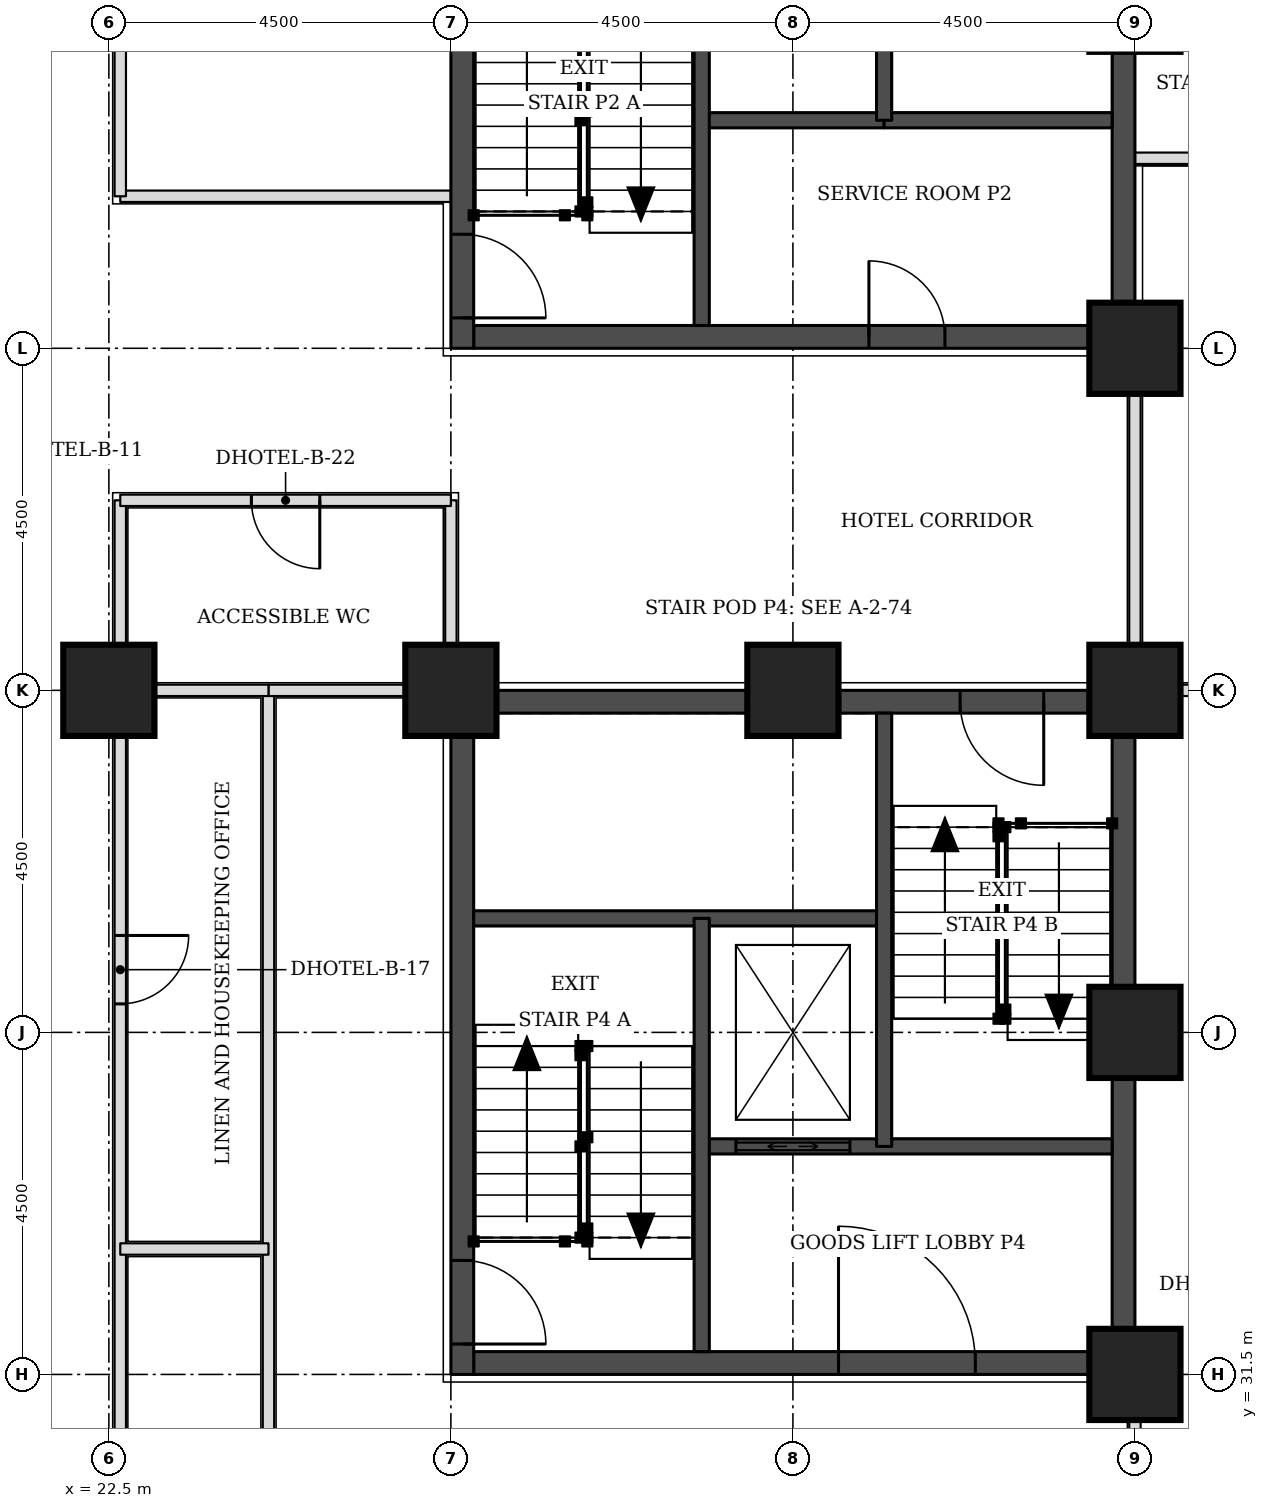
"""IFC4 building model, lengths in metres.
Left out: names, types, materials, properties, quantities, classifications, styles, units other than length and angle.
Written with IfcOpenShell. Run it as: python <this file> out.ifc"""

import sys

from ifc_helpers import new_model, si_unit, direction, frame, frame_2d, origin, origin_2d, place, context, subcontext, project, spatial, rectangle, extrude, element, fill, save


model = new_model("IFC4")
c1 = context("Model", 3, precision=1e-05, world=origin(), true_north=direction((0.0, 1.0)))
c2 = subcontext(c1, "Body", "Model", "MODEL_VIEW")
j1 = project(units=[si_unit("LENGTHUNIT", "METRE"), si_unit("PLANEANGLEUNIT", "RADIAN")], contexts=[c1])
p1 = place(None, origin())
s1 = spatial("IfcSite", under=j1, at=p1, CompositionType="ELEMENT")
p2 = place(p1, origin())
s2 = spatial("IfcBuilding", under=s1, at=p2, CompositionType="ELEMENT")
p3 = place(p2, frame((0.0, 0.0, 29.7)))
s3 = spatial("IfcBuildingStorey", under=s2, at=p3, CompositionType="ELEMENT", Elevation=29.7)
for number, where, z_axis, x_axis in (
    (1, (36.0, 31.5, 0.0), (0.0, 0.0, 1.0), (1.0, 0.0, 0.0)),
    (2, (36.0, 36.0, 0.0), (0.0, 0.0, 1.0), (1.0, 0.0, 0.0)),
    (3, (22.5, 40.5, 0.0), (0.0, 0.0, 1.0), (1.0, 0.0, 0.0)),
    (4, (27.0, 40.5, 0.0), (0.0, 0.0, 1.0), (1.0, 0.0, 0.0)),
    (5, (31.5, 40.5, 0.0), (0.0, 0.0, 1.0), (1.0, 0.0, 0.0)),
    (6, (36.0, 40.5, 0.0), (0.0, 0.0, 1.0), (1.0, 0.0, 0.0)),
    (7, (36.0, 45.0, 0.0), (0.0, 0.0, 1.0), (1.0, 0.0, 0.0)),
):
    element("IfcColumn", number, at=place(p3, frame(where, z_axis=z_axis, x_axis=x_axis)), inside=s3, PredefinedType="COLUMN", context=c2, shape_type="SweptSolid", body=[
        extrude(rectangle(XDim=1.2, YDim=1.2, at=origin_2d()), origin(), (0.0, 0.0, 1.0), 3.3),
    ])
p4 = place(p3, frame((27.3, 45.15, 0.0), z_axis=(0.0, 0.0, 1.0), x_axis=(1.0, 0.0, 0.0)))
e8 = element("IfcWall", 8, at=p4, inside=s3, PredefinedType="SHEAR", context=c2, shape_type="SweptSolid", body=[
    extrude(rectangle(XDim=8.4, YDim=0.3, at=frame_2d((4.2, 0.0))), origin(), (0.0, 0.0, 1.0), 3.3),
])
p5 = place(p4, frame((5.2, 0.0, 0.0)))
e9 = element("IfcOpeningElement", 9, at=p5, cuts=e8, PredefinedType="OPENING", context=c2, shape_type="SweptSolid", body=[
    extrude(rectangle(XDim=1.0, YDim=2.1, at=frame_2d((0.5, 1.05))), frame((0.0, 0.16, 0.0), z_axis=(0.0, -1.0, 0.0), x_axis=(1.0, 0.0, 0.0)), (0.0, 0.0, 1.0), 0.32),
])
p6 = place(p3, frame((27.15, 45.0, 0.0), z_axis=(0.0, 0.0, 1.0), x_axis=(0.0, 1.0, 0.0)))
e10 = element("IfcWall", 10, at=p6, inside=s3, PredefinedType="SHEAR", context=c2, shape_type="SweptSolid", body=[
    extrude(rectangle(XDim=9.0, YDim=0.3, at=frame_2d((4.5, 0.0))), origin(), (0.0, 0.0, 1.0), 3.3),
])
p7 = place(p6, frame((0.4, 0.0, 0.0)))
e11 = element("IfcOpeningElement", 11, at=p7, cuts=e10, PredefinedType="OPENING", context=c2, shape_type="SweptSolid", body=[
    extrude(rectangle(XDim=1.1, YDim=2.1, at=frame_2d((0.55, 1.05))), frame((0.0, 0.16, 0.0), z_axis=(0.0, -1.0, 0.0), x_axis=(1.0, 0.0, 0.0)), (0.0, 0.0, 1.0), 0.32),
])
p8 = place(p3, frame((35.85, 45.0, 0.0), z_axis=(0.0, 0.0, 1.0), x_axis=(0.0, 1.0, 0.0)))
e12 = element("IfcWall", 12, at=p8, inside=s3, PredefinedType="SHEAR", context=c2, shape_type="SweptSolid", body=[
    extrude(rectangle(XDim=9.0, YDim=0.3, at=frame_2d((4.5, 0.0))), origin(), (0.0, 0.0, 1.0), 3.3),
])
p9 = place(p3, frame((27.3, 31.65, 0.0), z_axis=(0.0, 0.0, 1.0), x_axis=(1.0, 0.0, 0.0)))
e13 = element("IfcWall", 13, at=p9, inside=s3, PredefinedType="SHEAR", context=c2, shape_type="SweptSolid", body=[
    extrude(rectangle(XDim=8.4, YDim=0.3, at=frame_2d((4.2, 0.0))), origin(), (0.0, 0.0, 1.0), 3.3),
])
p10 = place(p9, frame((4.8, 0.0, 0.0)))
e14 = element("IfcOpeningElement", 14, at=p10, cuts=e13, PredefinedType="OPENING", context=c2, shape_type="SweptSolid", body=[
    extrude(rectangle(XDim=1.8, YDim=2.1, at=frame_2d((0.9, 1.05))), frame((0.0, 0.16, 0.0), z_axis=(0.0, -1.0, 0.0), x_axis=(1.0, 0.0, 0.0)), (0.0, 0.0, 1.0), 0.32),
])
p11 = place(p3, frame((27.3, 40.35, 0.0), z_axis=(0.0, 0.0, 1.0), x_axis=(1.0, 0.0, 0.0)))
e15 = element("IfcWall", 15, at=p11, inside=s3, PredefinedType="SHEAR", context=c2, shape_type="SweptSolid", body=[
    extrude(rectangle(XDim=8.4, YDim=0.3, at=frame_2d((4.2, 0.0))), origin(), (0.0, 0.0, 1.0), 3.3),
])
p12 = place(p11, frame((6.4, 0.0, 0.0)))
e16 = element("IfcOpeningElement", 16, at=p12, cuts=e15, PredefinedType="OPENING", context=c2, shape_type="SweptSolid", body=[
    extrude(rectangle(XDim=1.1, YDim=2.1, at=frame_2d((0.55, 1.05))), frame((0.0, 0.16, 0.0), z_axis=(0.0, -1.0, 0.0), x_axis=(1.0, 0.0, 0.0)), (0.0, 0.0, 1.0), 0.32),
])
p13 = place(p3, frame((27.15, 31.5, 0.0), z_axis=(0.0, 0.0, 1.0), x_axis=(0.0, 1.0, 0.0)))
e17 = element("IfcWall", 17, at=p13, inside=s3, PredefinedType="SHEAR", context=c2, shape_type="SweptSolid", body=[
    extrude(rectangle(XDim=9.0, YDim=0.3, at=frame_2d((4.5, 0.0))), origin(), (0.0, 0.0, 1.0), 3.3),
])
p14 = place(p13, frame((0.4, 0.0, 0.0)))
e18 = element("IfcOpeningElement", 18, at=p14, cuts=e17, PredefinedType="OPENING", context=c2, shape_type="SweptSolid", body=[
    extrude(rectangle(XDim=1.1, YDim=2.1, at=frame_2d((0.55, 1.05))), frame((0.0, 0.16, 0.0), z_axis=(0.0, -1.0, 0.0), x_axis=(1.0, 0.0, 0.0)), (0.0, 0.0, 1.0), 0.32),
])
p15 = place(p3, frame((35.85, 31.5, 0.0), z_axis=(0.0, 0.0, 1.0), x_axis=(0.0, 1.0, 0.0)))
e19 = element("IfcWall", 19, at=p15, inside=s3, PredefinedType="SHEAR", context=c2, shape_type="SweptSolid", body=[
    extrude(rectangle(XDim=9.0, YDim=0.3, at=frame_2d((4.5, 0.0))), origin(), (0.0, 0.0, 1.0), 3.3),
])
p16 = place(p3, frame((22.65, 25.65, 0.0), z_axis=(0.0, 0.0, 1.0), x_axis=(0.0, 1.0, 0.0)))
e20 = element("IfcWall", 20, at=p16, inside=s3, PredefinedType="PARTITIONING", context=c2, shape_type="SweptSolid", body=[
    extrude(rectangle(XDim=17.35, YDim=0.15, at=frame_2d((8.675, 0.0))), origin(), (0.0, 0.0, 1.0), 3.08),
])
p17 = place(p16, frame((3.3, 0.0, 0.0)))
e21 = element("IfcOpeningElement", 21, at=p17, cuts=e20, PredefinedType="OPENING", context=c2, shape_type="SweptSolid", body=[
    extrude(rectangle(XDim=0.9, YDim=2.1, at=frame_2d((0.45, 1.05))), frame((0.0, 0.085, 0.0), z_axis=(0.0, -1.0, 0.0), x_axis=(1.0, 0.0, 0.0)), (0.0, 0.0, 1.0), 0.17),
])
p18 = place(p16, frame((10.725, 0.0, 0.0)))
e22 = element("IfcOpeningElement", 22, at=p18, cuts=e20, PredefinedType="OPENING", context=c2, shape_type="SweptSolid", body=[
    extrude(rectangle(XDim=0.9, YDim=2.1, at=frame_2d((0.45, 1.05))), frame((0.0, 0.085, 0.0), z_axis=(0.0, -1.0, 0.0), x_axis=(1.0, 0.0, 0.0)), (0.0, 0.0, 1.0), 0.17),
])
p19 = place(p3, frame((24.6, 25.65, 0.0), z_axis=(0.0, 0.0, 1.0), x_axis=(0.0, 1.0, 0.0)))
e23 = element("IfcWall", 23, at=p19, inside=s3, PredefinedType="PARTITIONING", context=c2, shape_type="SweptSolid", body=[
    extrude(rectangle(XDim=14.85, YDim=0.15, at=frame_2d((7.425, 0.0))), origin(), (0.0, 0.0, 1.0), 3.08),
])
p20 = place(p3, frame((36.0, 29.5, 0.0), z_axis=(0.0, 0.0, 1.0), x_axis=(0.0, 1.0, 0.0)))
e24 = element("IfcWall", 24, at=p20, inside=s3, PredefinedType="PARTITIONING", context=c2, shape_type="SweptSolid", body=[
    extrude(rectangle(XDim=1.95, YDim=0.15, at=frame_2d((0.975, 0.0))), origin(), (0.0, 0.0, 1.0), 2.33),
])
p21 = place(p3, frame((24.6, 40.5, 0.0), z_axis=(0.0, 0.0, 1.0), x_axis=(1.0, 0.0, 0.0)))
e25 = element("IfcWall", 25, at=p21, inside=s3, PredefinedType="PARTITIONING", context=c2, shape_type="SweptSolid", body=[
    extrude(rectangle(XDim=2.35, YDim=0.15, at=frame_2d((1.175, 0.0))), origin(), (0.0, 0.0, 1.0), 2.33),
])
p22 = place(p3, frame((27.0, 40.55, 0.0), z_axis=(0.0, 0.0, 1.0), x_axis=(0.0, 1.0, 0.0)))
e26 = element("IfcWall", 26, at=p22, inside=s3, PredefinedType="PARTITIONING", context=c2, shape_type="SweptSolid", body=[
    extrude(rectangle(XDim=2.45, YDim=0.15, at=frame_2d((1.225, 0.0))), origin(), (0.0, 0.0, 1.0), 3.08),
])
p23 = place(p3, frame((36.0, 40.55, 0.0), z_axis=(0.0, 0.0, 1.0), x_axis=(0.0, 1.0, 0.0)))
e27 = element("IfcWall", 27, at=p23, inside=s3, PredefinedType="PARTITIONING", context=c2, shape_type="SweptSolid", body=[
    extrude(rectangle(XDim=4.4, YDim=0.15, at=frame_2d((2.2, 0.0))), origin(), (0.0, 0.0, 1.0), 2.33),
])
p24 = place(p3, frame((22.65, 43.0, 0.0), z_axis=(0.0, 0.0, 1.0), x_axis=(1.0, 0.0, 0.0)))
e28 = element("IfcWall", 28, at=p24, inside=s3, PredefinedType="PARTITIONING", context=c2, shape_type="SweptSolid", body=[
    extrude(rectangle(XDim=4.35, YDim=0.15, at=frame_2d((2.175, 0.0))), origin(), (0.0, 0.0, 1.0), 3.08),
])
p25 = place(p24, frame((1.725, 0.0, 0.0)))
e29 = element("IfcOpeningElement", 29, at=p25, cuts=e28, PredefinedType="OPENING", context=c2, shape_type="SweptSolid", body=[
    extrude(rectangle(XDim=0.9, YDim=2.1, at=frame_2d((0.45, 1.05))), frame((0.0, 0.085, 0.0), z_axis=(0.0, -1.0, 0.0), x_axis=(1.0, 0.0, 0.0)), (0.0, 0.0, 1.0), 0.17),
])
p26 = place(p3, frame((22.65, 47.0, 0.0), z_axis=(0.0, 0.0, 1.0), x_axis=(1.0, 0.0, 0.0)))
e30 = element("IfcWall", 30, at=p26, inside=s3, PredefinedType="PARTITIONING", context=c2, shape_type="SweptSolid", body=[
    extrude(rectangle(XDim=4.35, YDim=0.15, at=frame_2d((2.175, 0.0))), origin(), (0.0, 0.0, 1.0), 3.08),
])
p27 = place(p3, frame((22.65, 47.0, 0.0), z_axis=(0.0, 0.0, 1.0), x_axis=(0.0, 1.0, 0.0)))
e31 = element("IfcWall", 31, at=p27, inside=s3, PredefinedType="PARTITIONING", context=c2, shape_type="SweptSolid", body=[
    extrude(rectangle(XDim=2.5, YDim=0.15, at=frame_2d((1.25, 0.0))), origin(), (0.0, 0.0, 1.0), 3.08),
])
p28 = place(p3, frame((22.65, 33.15, 0.0), z_axis=(0.0, 0.0, 1.0), x_axis=(1.0, 0.0, 0.0)))
e32 = element("IfcWall", 32, at=p28, inside=s3, PredefinedType="PARTITIONING", context=c2, shape_type="SweptSolid", body=[
    extrude(rectangle(XDim=1.95, YDim=0.15, at=frame_2d((0.975, 0.0))), origin(), (0.0, 0.0, 1.0), 3.08),
])
p29 = place(p3, frame((22.65, 40.5, 0.0), z_axis=(0.0, 0.0, 1.0), x_axis=(1.0, 0.0, 0.0)))
e33 = element("IfcWall", 33, at=p29, inside=s3, PredefinedType="PARTITIONING", context=c2, shape_type="SweptSolid", body=[
    extrude(rectangle(XDim=1.95, YDim=0.15, at=frame_2d((0.975, 0.0))), origin(), (0.0, 0.0, 1.0), 2.33),
])
p30 = place(p3, frame((36.05, 40.5, 0.0), z_axis=(0.0, 0.0, 1.0), x_axis=(1.0, 0.0, 0.0)))
e34 = element("IfcWall", 34, at=p30, inside=s3, PredefinedType="PARTITIONING", context=c2, shape_type="SweptSolid", body=[
    extrude(rectangle(XDim=2.45, YDim=0.15, at=frame_2d((1.225, 0.0))), origin(), (0.0, 0.0, 1.0), 2.33),
])
p31 = place(p3, frame((36.0, 47.5, 0.0), z_axis=(0.0, 0.0, 1.0), x_axis=(1.0, 0.0, 0.0)))
e35 = element("IfcWall", 35, at=p31, inside=s3, PredefinedType="PARTITIONING", context=c2, shape_type="SweptSolid", body=[
    extrude(rectangle(XDim=7.0, YDim=0.15, at=frame_2d((3.5, 0.0))), origin(), (0.0, 0.0, 1.0), 3.08),
])
p32 = place(p3, frame((30.3, 48.0, 0.0), z_axis=(0.0, 0.0, 1.0), x_axis=(1.0, 0.0, 0.0)))
e36 = element("IfcWall", 36, at=p32, inside=s3, PredefinedType="SOLIDWALL", context=c2, shape_type="SweptSolid", body=[
    extrude(rectangle(XDim=2.4, YDim=0.2, at=frame_2d((1.2, 0.0))), origin(), (0.0, 0.0, 1.0), 3.08),
])
p33 = place(p3, frame((32.7, 48.0, 0.0), z_axis=(0.0, 0.0, 1.0), x_axis=(1.0, 0.0, 0.0)))
e37 = element("IfcWall", 37, at=p33, inside=s3, PredefinedType="SOLIDWALL", context=c2, shape_type="SweptSolid", body=[
    extrude(rectangle(XDim=3.0, YDim=0.2, at=frame_2d((1.5, 0.0))), origin(), (0.0, 0.0, 1.0), 3.08),
])
for number, where, z_axis, x_axis in (
    (38, (30.3, 45.3, 0.0), (0.0, 0.0, 1.0), (0.0, 1.0, 0.0)),
    (39, (32.7, 48.0, 0.0), (0.0, 0.0, 1.0), (0.0, 1.0, 0.0)),
):
    element("IfcWall", number, at=place(p3, frame(where, z_axis=z_axis, x_axis=x_axis)), inside=s3, PredefinedType="SOLIDWALL", context=c2, shape_type="SweptSolid", body=[
        extrude(rectangle(XDim=5.7, YDim=0.2, at=frame_2d((2.85, 0.0))), origin(), (0.0, 0.0, 1.0), 3.08),
    ])
p34 = place(p3, frame((30.3, 34.5, 0.0), z_axis=(0.0, 0.0, 1.0), x_axis=(1.0, 0.0, 0.0)))
e40 = element("IfcWall", 40, at=p34, inside=s3, PredefinedType="SOLIDWALL", context=c2, shape_type="SweptSolid", body=[
    extrude(rectangle(XDim=5.4, YDim=0.2, at=frame_2d((2.7, 0.0))), origin(), (0.0, 0.0, 1.0), 3.08),
])
p35 = place(p34, frame((0.45, 0.0, 0.0)))
e41 = element("IfcOpeningElement", 41, at=p35, cuts=e40, PredefinedType="OPENING", context=c2, shape_type="SweptSolid", body=[
    extrude(rectangle(XDim=1.5, YDim=2.1, at=frame_2d((0.75, 1.05))), frame((0.0, 0.11, 0.0), z_axis=(0.0, -1.0, 0.0), x_axis=(1.0, 0.0, 0.0)), (0.0, 0.0, 1.0), 0.22),
])
p36 = place(p3, frame((27.3, 37.5, 0.0), z_axis=(0.0, 0.0, 1.0), x_axis=(1.0, 0.0, 0.0)))
e42 = element("IfcWall", 42, at=p36, inside=s3, PredefinedType="SOLIDWALL", context=c2, shape_type="SweptSolid", body=[
    extrude(rectangle(XDim=5.4, YDim=0.2, at=frame_2d((2.7, 0.0))), origin(), (0.0, 0.0, 1.0), 3.08),
])
for number, where, z_axis, x_axis in (
    (43, (30.3, 31.8, 0.0), (0.0, 0.0, 1.0), (0.0, 1.0, 0.0)),
    (44, (32.7, 34.5, 0.0), (0.0, 0.0, 1.0), (0.0, 1.0, 0.0)),
):
    element("IfcWall", number, at=place(p3, frame(where, z_axis=z_axis, x_axis=x_axis)), inside=s3, PredefinedType="SOLIDWALL", context=c2, shape_type="SweptSolid", body=[
        extrude(rectangle(XDim=5.7, YDim=0.2, at=frame_2d((2.85, 0.0))), origin(), (0.0, 0.0, 1.0), 3.08),
    ])
p37 = place(p18, frame((0.9, 0.0, 0.0), z_axis=(0.0, 0.0, 1.0), x_axis=(-1.0, 0.0, 0.0)))
e45 = element("IfcDoor", 45, at=p37, inside=s3, OperationType="SINGLE_SWING_LEFT", PredefinedType="DOOR", context=c2, shape_type="SweptSolid", body=[
    extrude(rectangle(XDim=0.9, YDim=2.1, at=frame_2d((0.45, 1.05))), frame((0.0, 0.025, 0.0), z_axis=(0.0, -1.0, 0.0), x_axis=(1.0, 0.0, 0.0)), (0.0, 0.0, 1.0), 0.05),
])
fill(e22, e45)
p38 = place(p25, frame((0.9, 0.0, 0.0), z_axis=(0.0, 0.0, 1.0), x_axis=(-1.0, 0.0, 0.0)))
e46 = element("IfcDoor", 46, at=p38, inside=s3, OperationType="SINGLE_SWING_LEFT", PredefinedType="DOOR", context=c2, shape_type="SweptSolid", body=[
    extrude(rectangle(XDim=0.9, YDim=2.1, at=frame_2d((0.45, 1.05))), frame((0.0, 0.025, 0.0), z_axis=(0.0, -1.0, 0.0), x_axis=(1.0, 0.0, 0.0)), (0.0, 0.0, 1.0), 0.05),
])
fill(e29, e46)
p39 = place(p7, frame((1.1, 0.0, 0.0), z_axis=(0.0, 0.0, 1.0), x_axis=(-1.0, 0.0, 0.0)))
e47 = element("IfcDoor", 47, at=p39, inside=s3, OperationType="SINGLE_SWING_RIGHT", PredefinedType="DOOR", context=c2, shape_type="SweptSolid", body=[
    extrude(rectangle(XDim=1.1, YDim=2.1, at=frame_2d((0.55, 1.05))), frame((0.0, 0.025, 0.0), z_axis=(0.0, -1.0, 0.0), x_axis=(1.0, 0.0, 0.0)), (0.0, 0.0, 1.0), 0.05),
])
fill(e11, e47)
p40 = place(p5, origin())
e48 = element("IfcDoor", 48, at=p40, inside=s3, OperationType="SINGLE_SWING_LEFT", PredefinedType="DOOR", context=c2, shape_type="SweptSolid", body=[
    extrude(rectangle(XDim=1.0, YDim=2.1, at=frame_2d((0.5, 1.05))), frame((0.0, 0.025, 0.0), z_axis=(0.0, -1.0, 0.0), x_axis=(1.0, 0.0, 0.0)), (0.0, 0.0, 1.0), 0.05),
])
fill(e9, e48)
p41 = place(p14, frame((1.1, 0.0, 0.0), z_axis=(0.0, 0.0, 1.0), x_axis=(-1.0, 0.0, 0.0)))
e49 = element("IfcDoor", 49, at=p41, inside=s3, OperationType="SINGLE_SWING_RIGHT", PredefinedType="DOOR", context=c2, shape_type="SweptSolid", body=[
    extrude(rectangle(XDim=1.1, YDim=2.1, at=frame_2d((0.55, 1.05))), frame((0.0, 0.025, 0.0), z_axis=(0.0, -1.0, 0.0), x_axis=(1.0, 0.0, 0.0)), (0.0, 0.0, 1.0), 0.05),
])
fill(e18, e49)
p42 = place(p12, frame((1.1, 0.0, 0.0), z_axis=(0.0, 0.0, 1.0), x_axis=(-1.0, 0.0, 0.0)))
e50 = element("IfcDoor", 50, at=p42, inside=s3, OperationType="SINGLE_SWING_LEFT", PredefinedType="DOOR", context=c2, shape_type="SweptSolid", body=[
    extrude(rectangle(XDim=1.1, YDim=2.1, at=frame_2d((0.55, 1.05))), frame((0.0, 0.025, 0.0), z_axis=(0.0, -1.0, 0.0), x_axis=(1.0, 0.0, 0.0)), (0.0, 0.0, 1.0), 0.05),
])
fill(e16, e50)
p43 = place(p35, origin())
e51 = element("IfcDoor", 51, at=p43, inside=s3, OperationType="DOUBLE_DOOR_SLIDING", PredefinedType="DOOR", context=c2, shape_type="SweptSolid", body=[
    extrude(rectangle(XDim=1.5, YDim=2.1, at=frame_2d((0.75, 1.05))), frame((0.0, 0.025, 0.0), z_axis=(0.0, -1.0, 0.0), x_axis=(1.0, 0.0, 0.0)), (0.0, 0.0, 1.0), 0.05),
])
fill(e41, e51)
p44 = place(p10, origin())
e52 = element("IfcDoor", 52, at=p44, inside=s3, OperationType="SINGLE_SWING_LEFT", PredefinedType="DOOR", context=c2, shape_type="SweptSolid", body=[
    extrude(rectangle(XDim=1.8, YDim=2.1, at=frame_2d((0.9, 1.05))), frame((0.0, 0.025, 0.0), z_axis=(0.0, -1.0, 0.0), x_axis=(1.0, 0.0, 0.0)), (0.0, 0.0, 1.0), 0.05),
])
fill(e14, e52)
save(model, sys.argv[1])
